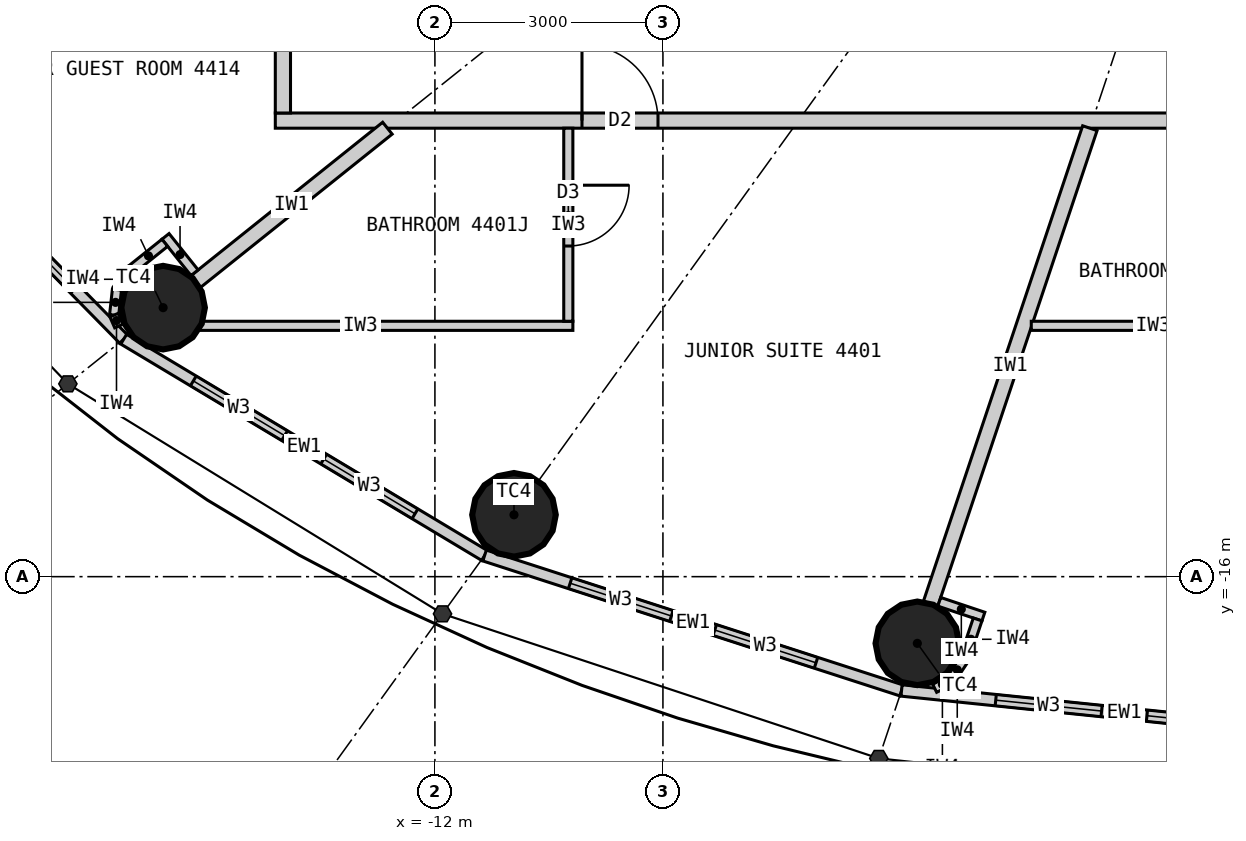
"""IFC4 building model, lengths in metres.
Left out: names, types, materials, properties, quantities, classifications, styles, units other than length and angle.
Written with IfcOpenShell. Run it as: python <this file> out.ifc"""

import sys

from ifc_helpers import new_model, si_unit, direction, frame, frame_2d, origin, origin_2d, place, context, subcontext, project, spatial, rectangle, circle, extrude, element, fill, save


model = new_model("IFC4")
c1 = context("Model", 3, precision=1e-05, world=origin(), true_north=direction((0.0, 1.0)))
c2 = subcontext(c1, "Body", "Model", "MODEL_VIEW")
j1 = project(units=[si_unit("LENGTHUNIT", "METRE"), si_unit("PLANEANGLEUNIT", "RADIAN")], contexts=[c1])
p1 = place(None, origin())
s1 = spatial("IfcSite", under=j1, at=p1, CompositionType="ELEMENT")
p2 = place(p1, origin())
s2 = spatial("IfcBuilding", under=s1, at=p2, CompositionType="ELEMENT")
p3 = place(p2, frame((0.0, 0.0, 166.5)))
s3 = spatial("IfcBuildingStorey", under=s2, at=p3, CompositionType="ELEMENT", Elevation=166.5)
for number, where, z_axis, x_axis in (
    (1, (-15.576, -12.461, 0.0), (0.0, 0.0, 1.0), (1.0, 0.0, 0.0)),
    (2, (-10.96, -15.186, 0.0), (0.0, 0.0, 1.0), (1.0, 0.0, 0.0)),
    (3, (-5.653, -16.877, 0.0), (0.0, 0.0, 1.0), (1.0, 0.0, 0.0)),
):
    element("IfcColumn", number, at=place(p3, frame(where, z_axis=z_axis, x_axis=x_axis)), inside=s3, PredefinedType="COLUMN", context=c2, shape_type="SweptSolid", body=[
        extrude(circle(Radius=0.55, at=origin_2d()), origin(), (0.0, 0.0, 1.0), 3.3),
    ])
p4 = place(p3, frame((-19.772, -9.132, 0.0), z_axis=(0.0, 0.0, 1.0), x_axis=(0.700727467776, -0.71342905457, 0.0)))
e4 = element("IfcWall", 4, at=p4, inside=s3, PredefinedType="ELEMENTEDWALL", context=c2, shape_type="SweptSolid", body=[
    extrude(rectangle(XDim=5.247, YDim=0.15, at=frame_2d((2.624, 0.0))), origin(), (0.0, 0.0, 1.0), 3.12),
])
p5 = place(p4, frame((0.924, 0.0, 0.9)))
e5 = element("IfcOpeningElement", 5, at=p5, cuts=e4, PredefinedType="OPENING", context=c2, shape_type="SweptSolid", body=[
    extrude(rectangle(XDim=1.4, YDim=1.9, at=frame_2d((0.7, 0.95))), frame((0.0, 0.085, 0.0), z_axis=(0.0, -1.0, 0.0), x_axis=(1.0, 0.0, 0.0)), (0.0, 0.0, 1.0), 0.17),
])
p6 = place(p4, frame((2.924, 0.0, 0.9)))
e6 = element("IfcOpeningElement", 6, at=p6, cuts=e4, PredefinedType="OPENING", context=c2, shape_type="SweptSolid", body=[
    extrude(rectangle(XDim=1.4, YDim=1.9, at=frame_2d((0.7, 0.95))), frame((0.0, 0.085, 0.0), z_axis=(0.0, -1.0, 0.0), x_axis=(1.0, 0.0, 0.0)), (0.0, 0.0, 1.0), 0.17),
])
p7 = place(p3, frame((-16.095, -12.876, 0.0), z_axis=(0.0, 0.0, 1.0), x_axis=(0.857695199231, -0.514158482587, 0.0)))
e7 = element("IfcWall", 7, at=p7, inside=s3, PredefinedType="ELEMENTEDWALL", context=c2, shape_type="SweptSolid", body=[
    extrude(rectangle(XDim=5.536, YDim=0.15, at=frame_2d((2.768, 0.0))), origin(), (0.0, 0.0, 1.0), 3.12),
])
p8 = place(p7, frame((1.068, 0.0, 0.9)))
e8 = element("IfcOpeningElement", 8, at=p8, cuts=e7, PredefinedType="OPENING", context=c2, shape_type="SweptSolid", body=[
    extrude(rectangle(XDim=1.4, YDim=1.9, at=frame_2d((0.7, 0.95))), frame((0.0, 0.085, 0.0), z_axis=(0.0, -1.0, 0.0), x_axis=(1.0, 0.0, 0.0)), (0.0, 0.0, 1.0), 0.17),
])
p9 = place(p7, frame((3.068, 0.0, 0.9)))
e9 = element("IfcOpeningElement", 9, at=p9, cuts=e7, PredefinedType="OPENING", context=c2, shape_type="SweptSolid", body=[
    extrude(rectangle(XDim=1.4, YDim=1.9, at=frame_2d((0.7, 0.95))), frame((0.0, 0.085, 0.0), z_axis=(0.0, -1.0, 0.0), x_axis=(1.0, 0.0, 0.0)), (0.0, 0.0, 1.0), 0.17),
])
p10 = place(p3, frame((-11.346, -15.722, 0.0), z_axis=(0.0, 0.0, 1.0), x_axis=(0.951432482129, -0.307857486429, 0.0)))
e10 = element("IfcWall", 10, at=p10, inside=s3, PredefinedType="ELEMENTEDWALL", context=c2, shape_type="SweptSolid", body=[
    extrude(rectangle(XDim=5.766, YDim=0.15, at=frame_2d((2.883, 0.0))), origin(), (0.0, 0.0, 1.0), 3.12),
])
p11 = place(p10, frame((1.183, 0.0, 0.9)))
e11 = element("IfcOpeningElement", 11, at=p11, cuts=e10, PredefinedType="OPENING", context=c2, shape_type="SweptSolid", body=[
    extrude(rectangle(XDim=1.4, YDim=1.9, at=frame_2d((0.7, 0.95))), frame((0.0, 0.085, 0.0), z_axis=(0.0, -1.0, 0.0), x_axis=(1.0, 0.0, 0.0)), (0.0, 0.0, 1.0), 0.17),
])
p12 = place(p10, frame((3.183, 0.0, 0.9)))
e12 = element("IfcOpeningElement", 12, at=p12, cuts=e10, PredefinedType="OPENING", context=c2, shape_type="SweptSolid", body=[
    extrude(rectangle(XDim=1.4, YDim=1.9, at=frame_2d((0.7, 0.95))), frame((0.0, 0.085, 0.0), z_axis=(0.0, -1.0, 0.0), x_axis=(1.0, 0.0, 0.0)), (0.0, 0.0, 1.0), 0.17),
])
p13 = place(p3, frame((-5.86, -17.497, 0.0), z_axis=(0.0, 0.0, 1.0), x_axis=(0.994751738032, -0.102318032045, 0.0)))
e13 = element("IfcWall", 13, at=p13, inside=s3, PredefinedType="ELEMENTEDWALL", context=c2, shape_type="SweptSolid", body=[
    extrude(rectangle(XDim=5.891, YDim=0.15, at=frame_2d((2.946, 0.0))), origin(), (0.0, 0.0, 1.0), 3.12),
])
p14 = place(p13, frame((1.246, 0.0, 0.9)))
e14 = element("IfcOpeningElement", 14, at=p14, cuts=e13, PredefinedType="OPENING", context=c2, shape_type="SweptSolid", body=[
    extrude(rectangle(XDim=1.4, YDim=1.9, at=frame_2d((0.7, 0.95))), frame((0.0, 0.085, 0.0), z_axis=(0.0, -1.0, 0.0), x_axis=(1.0, 0.0, 0.0)), (0.0, 0.0, 1.0), 0.17),
])
p15 = place(p13, frame((3.246, 0.0, 0.9)))
e15 = element("IfcOpeningElement", 15, at=p15, cuts=e13, PredefinedType="OPENING", context=c2, shape_type="SweptSolid", body=[
    extrude(rectangle(XDim=1.4, YDim=1.9, at=frame_2d((0.7, 0.95))), frame((0.0, 0.085, 0.0), z_axis=(0.0, -1.0, 0.0), x_axis=(1.0, 0.0, 0.0)), (0.0, 0.0, 1.0), 0.17),
])
p16 = place(p3, frame((14.1, -10.0, 0.0), z_axis=(0.0, 0.0, 1.0), x_axis=(-1.0, 0.0, 0.0)))
e16 = element("IfcWall", 16, at=p16, inside=s3, PredefinedType="PARTITIONING", context=c2, shape_type="SweptSolid", body=[
    extrude(rectangle(XDim=28.2, YDim=0.2, at=frame_2d((14.1, 0.0))), origin(), (0.0, 0.0, 1.0), 3.12),
])
p17 = place(p16, frame((23.165, 0.0, 0.0)))
e17 = element("IfcOpeningElement", 17, at=p17, cuts=e16, PredefinedType="OPENING", context=c2, shape_type="SweptSolid", body=[
    extrude(rectangle(XDim=1.0, YDim=2.2, at=frame_2d((0.5, 1.1))), frame((0.0, 0.11, 0.0), z_axis=(0.0, -1.0, 0.0), x_axis=(1.0, 0.0, 0.0)), (0.0, 0.0, 1.0), 0.22),
])
p18 = place(p16, frame((13.923, 0.0, 0.0)))
e18 = element("IfcOpeningElement", 18, at=p18, cuts=e16, PredefinedType="OPENING", context=c2, shape_type="SweptSolid", body=[
    extrude(rectangle(XDim=1.0, YDim=2.2, at=frame_2d((0.5, 1.1))), frame((0.0, 0.11, 0.0), z_axis=(0.0, -1.0, 0.0), x_axis=(1.0, 0.0, 0.0)), (0.0, 0.0, 1.0), 0.22),
])
p19 = place(p16, frame((7.957, 0.0, 0.0)))
e19 = element("IfcOpeningElement", 19, at=p19, cuts=e16, PredefinedType="OPENING", context=c2, shape_type="SweptSolid", body=[
    extrude(rectangle(XDim=1.0, YDim=2.2, at=frame_2d((0.5, 1.1))), frame((0.0, 0.11, 0.0), z_axis=(0.0, -1.0, 0.0), x_axis=(1.0, 0.0, 0.0)), (0.0, 0.0, 1.0), 0.22),
])
p20 = place(p3, frame((-12.625, -10.1, 0.0), z_axis=(0.0, 0.0, 1.0), x_axis=(-0.780876185034, -0.624685827954, 0.0)))
e20 = element("IfcWall", 20, at=p20, inside=s3, PredefinedType="PARTITIONING", context=c2, shape_type="SweptSolid", body=[
    extrude(rectangle(XDim=3.229, YDim=0.2, at=frame_2d((1.615, 0.0))), origin(), (0.0, 0.0, 1.0), 2.42),
])
p21 = place(p3, frame((-3.383, -10.1, 0.0), z_axis=(0.0, 0.0, 1.0), x_axis=(-0.317615120474, -0.948219718866, 0.0)))
e21 = element("IfcWall", 21, at=p21, inside=s3, PredefinedType="PARTITIONING", context=c2, shape_type="SweptSolid", body=[
    extrude(rectangle(XDim=6.597, YDim=0.2, at=frame_2d((3.299, 0.0))), origin(), (0.0, 0.0, 1.0), 2.42),
])
p22 = place(p3, frame((-15.775, -12.7, 0.0), z_axis=(0.0, 0.0, 1.0), x_axis=(1.0, 0.0, 0.0)))
e22 = element("IfcWall", 22, at=p22, inside=s3, PredefinedType="PARTITIONING", context=c2, shape_type="SweptSolid", body=[
    extrude(rectangle(XDim=5.59, YDim=0.12, at=frame_2d((2.795, 0.0))), origin(), (0.0, 0.0, 1.0), 3.12),
])
p23 = place(p3, frame((-10.245, -10.1, 0.0), z_axis=(0.0, 0.0, 1.0), x_axis=(0.0, -1.0, 0.0)))
e23 = element("IfcWall", 23, at=p23, inside=s3, PredefinedType="PARTITIONING", context=c2, shape_type="SweptSolid", body=[
    extrude(rectangle(XDim=2.54, YDim=0.12, at=frame_2d((1.27, 0.0))), origin(), (0.0, 0.0, 1.0), 3.12),
])
p24 = place(p23, frame((0.75, 0.0, 0.0)))
e24 = element("IfcOpeningElement", 24, at=p24, cuts=e23, PredefinedType="OPENING", context=c2, shape_type="SweptSolid", body=[
    extrude(rectangle(XDim=0.8, YDim=2.1, at=frame_2d((0.4, 1.05))), frame((0.0, 0.07, 0.0), z_axis=(0.0, -1.0, 0.0), x_axis=(1.0, 0.0, 0.0)), (0.0, 0.0, 1.0), 0.14),
])
p25 = place(p3, frame((-4.154, -12.7, 0.0), z_axis=(0.0, 0.0, 1.0), x_axis=(1.0, 0.0, 0.0)))
e25 = element("IfcWall", 25, at=p25, inside=s3, PredefinedType="PARTITIONING", context=c2, shape_type="SweptSolid", body=[
    extrude(rectangle(XDim=3.211, YDim=0.12, at=frame_2d((1.605, 0.0))), origin(), (0.0, 0.0, 1.0), 3.12),
])
p26 = place(p3, frame((-14.0, -1.67, 0.0), z_axis=(0.0, 0.0, 1.0), x_axis=(0.0, -1.0, 0.0)))
e26 = element("IfcWall", 26, at=p26, inside=s3, PredefinedType="PARTITIONING", context=c2, shape_type="SweptSolid", body=[
    extrude(rectangle(XDim=8.23, YDim=0.2, at=frame_2d((4.115, 0.0))), origin(), (0.0, 0.0, 1.0), 3.12),
])
p27 = place(p26, frame((5.552, 0.0, 0.0)))
e27 = element("IfcOpeningElement", 27, at=p27, cuts=e26, PredefinedType="OPENING", context=c2, shape_type="SweptSolid", body=[
    extrude(rectangle(XDim=1.0, YDim=2.2, at=frame_2d((0.5, 1.1))), frame((0.0, 0.11, 0.0), z_axis=(0.0, -1.0, 0.0), x_axis=(1.0, 0.0, 0.0)), (0.0, 0.0, 1.0), 0.22),
])
p28 = place(p3, frame((-15.162, -12.002, 0.0), z_axis=(0.0, 0.0, 1.0), x_axis=(-0.624597762427, 0.780946627607, 0.0)))
e28 = element("IfcWall", 28, at=p28, inside=s3, PredefinedType="PARTITIONING", context=c2, shape_type="SweptSolid", body=[
    extrude(rectangle(XDim=0.612, YDim=0.12, at=frame_2d((0.306, 0.0))), origin(), (0.0, 0.0, 1.0), 3.12),
])
p29 = place(p3, frame((-15.554, -11.608, 0.0), z_axis=(0.0, 0.0, 1.0), x_axis=(-0.780695577787, -0.624911525597, 0.0)))
e29 = element("IfcWall", 29, at=p29, inside=s3, PredefinedType="PARTITIONING", context=c2, shape_type="SweptSolid", body=[
    extrude(rectangle(XDim=0.55, YDim=0.12, at=frame_2d((0.275, 0.0))), origin(), (0.0, 0.0, 1.0), 3.12),
])
p30 = place(p3, frame((-15.984, -11.952, 0.0), z_axis=(0.0, 0.0, 1.0), x_axis=(-0.592335221171, -0.805691619517, 0.0)))
e30 = element("IfcWall", 30, at=p30, inside=s3, PredefinedType="PARTITIONING", context=c2, shape_type="SweptSolid", body=[
    extrude(rectangle(XDim=0.338, YDim=0.12, at=frame_2d((0.169, 0.0))), origin(), (0.0, 0.0, 1.0), 3.12),
])
p31 = place(p3, frame((-16.184, -12.224, 0.0), z_axis=(0.0, 0.0, 1.0), x_axis=(-0.110669692975, -0.993857242795, 0.0)))
e31 = element("IfcWall", 31, at=p31, inside=s3, PredefinedType="PARTITIONING", context=c2, shape_type="SweptSolid", body=[
    extrude(rectangle(XDim=0.337, YDim=0.12, at=frame_2d((0.169, 0.0))), origin(), (0.0, 0.0, 1.0), 3.12),
])
p32 = place(p3, frame((-16.221, -12.559, 0.0), z_axis=(0.0, 0.0, 1.0), x_axis=(0.401064416249, -0.916049853457, 0.0)))
e32 = element("IfcWall", 32, at=p32, inside=s3, PredefinedType="PARTITIONING", context=c2, shape_type="SweptSolid", body=[
    extrude(rectangle(XDim=0.156, YDim=0.12, at=frame_2d((0.078, 0.0))), origin(), (0.0, 0.0, 1.0), 3.12),
])
p33 = place(p3, frame((-5.364, -16.331, 0.0), z_axis=(0.0, 0.0, 1.0), x_axis=(0.948283770087, -0.317423835572, 0.0)))
e33 = element("IfcWall", 33, at=p33, inside=s3, PredefinedType="PARTITIONING", context=c2, shape_type="SweptSolid", body=[
    extrude(rectangle(XDim=0.612, YDim=0.12, at=frame_2d((0.306, 0.0))), origin(), (0.0, 0.0, 1.0), 3.12),
])
p34 = place(p3, frame((-4.86, -16.563, 0.0), z_axis=(0.0, 0.0, 1.0), x_axis=(-0.317825321803, -0.948149284038, 0.0)))
e34 = element("IfcWall", 34, at=p34, inside=s3, PredefinedType="PARTITIONING", context=c2, shape_type="SweptSolid", body=[
    extrude(rectangle(XDim=0.55, YDim=0.12, at=frame_2d((0.275, 0.0))), origin(), (0.0, 0.0, 1.0), 3.12),
])
p35 = place(p3, frame((-5.034, -17.084, 0.0), z_axis=(0.0, 0.0, 1.0), x_axis=(-0.552362205726, -0.833604218851, 0.0)))
e35 = element("IfcWall", 35, at=p35, inside=s3, PredefinedType="PARTITIONING", context=c2, shape_type="SweptSolid", body=[
    extrude(rectangle(XDim=0.338, YDim=0.12, at=frame_2d((0.169, 0.0))), origin(), (0.0, 0.0, 1.0), 3.12),
])
p36 = place(p3, frame((-5.221, -17.366, 0.0), z_axis=(0.0, 0.0, 1.0), x_axis=(-0.895067896179, -0.445929883759, 0.0)))
e36 = element("IfcWall", 36, at=p36, inside=s3, PredefinedType="PARTITIONING", context=c2, shape_type="SweptSolid", body=[
    extrude(rectangle(XDim=0.228, YDim=0.12, at=frame_2d((0.114, 0.0))), origin(), (0.0, 0.0, 1.0), 3.12),
])
p37 = place(p6, origin())
e37 = element("IfcWindow", 37, at=p37, inside=s3, PartitioningType="SINGLE_PANEL", PredefinedType="WINDOW", context=c2, shape_type="SweptSolid", body=[
    extrude(rectangle(XDim=1.4, YDim=1.9, at=frame_2d((0.7, 0.95))), frame((0.0, 0.03, 0.0), z_axis=(0.0, -1.0, 0.0), x_axis=(1.0, 0.0, 0.0)), (0.0, 0.0, 1.0), 0.06),
])
fill(e6, e37)
p38 = place(p8, origin())
e38 = element("IfcWindow", 38, at=p38, inside=s3, PartitioningType="SINGLE_PANEL", PredefinedType="WINDOW", context=c2, shape_type="SweptSolid", body=[
    extrude(rectangle(XDim=1.4, YDim=1.9, at=frame_2d((0.7, 0.95))), frame((0.0, 0.03, 0.0), z_axis=(0.0, -1.0, 0.0), x_axis=(1.0, 0.0, 0.0)), (0.0, 0.0, 1.0), 0.06),
])
fill(e8, e38)
p39 = place(p9, origin())
e39 = element("IfcWindow", 39, at=p39, inside=s3, PartitioningType="SINGLE_PANEL", PredefinedType="WINDOW", context=c2, shape_type="SweptSolid", body=[
    extrude(rectangle(XDim=1.4, YDim=1.9, at=frame_2d((0.7, 0.95))), frame((0.0, 0.03, 0.0), z_axis=(0.0, -1.0, 0.0), x_axis=(1.0, 0.0, 0.0)), (0.0, 0.0, 1.0), 0.06),
])
fill(e9, e39)
p40 = place(p11, origin())
e40 = element("IfcWindow", 40, at=p40, inside=s3, PartitioningType="SINGLE_PANEL", PredefinedType="WINDOW", context=c2, shape_type="SweptSolid", body=[
    extrude(rectangle(XDim=1.4, YDim=1.9, at=frame_2d((0.7, 0.95))), frame((0.0, 0.03, 0.0), z_axis=(0.0, -1.0, 0.0), x_axis=(1.0, 0.0, 0.0)), (0.0, 0.0, 1.0), 0.06),
])
fill(e11, e40)
p41 = place(p12, origin())
e41 = element("IfcWindow", 41, at=p41, inside=s3, PartitioningType="SINGLE_PANEL", PredefinedType="WINDOW", context=c2, shape_type="SweptSolid", body=[
    extrude(rectangle(XDim=1.4, YDim=1.9, at=frame_2d((0.7, 0.95))), frame((0.0, 0.03, 0.0), z_axis=(0.0, -1.0, 0.0), x_axis=(1.0, 0.0, 0.0)), (0.0, 0.0, 1.0), 0.06),
])
fill(e12, e41)
p42 = place(p14, origin())
e42 = element("IfcWindow", 42, at=p42, inside=s3, PartitioningType="SINGLE_PANEL", PredefinedType="WINDOW", context=c2, shape_type="SweptSolid", body=[
    extrude(rectangle(XDim=1.4, YDim=1.9, at=frame_2d((0.7, 0.95))), frame((0.0, 0.03, 0.0), z_axis=(0.0, -1.0, 0.0), x_axis=(1.0, 0.0, 0.0)), (0.0, 0.0, 1.0), 0.06),
])
fill(e14, e42)
p43 = place(p15, origin())
e43 = element("IfcWindow", 43, at=p43, inside=s3, PartitioningType="SINGLE_PANEL", PredefinedType="WINDOW", context=c2, shape_type="SweptSolid", body=[
    extrude(rectangle(XDim=1.4, YDim=1.9, at=frame_2d((0.7, 0.95))), frame((0.0, 0.03, 0.0), z_axis=(0.0, -1.0, 0.0), x_axis=(1.0, 0.0, 0.0)), (0.0, 0.0, 1.0), 0.06),
])
fill(e15, e43)
p44 = place(p24, origin())
e44 = element("IfcDoor", 44, at=p44, inside=s3, OperationType="SINGLE_SWING_LEFT", PredefinedType="DOOR", context=c2, shape_type="SweptSolid", body=[
    extrude(rectangle(XDim=0.8, YDim=2.1, at=frame_2d((0.4, 1.05))), frame((0.0, 0.025, 0.0), z_axis=(0.0, -1.0, 0.0), x_axis=(1.0, 0.0, 0.0)), (0.0, 0.0, 1.0), 0.05),
])
fill(e24, e44)
p45 = place(p17, origin())
e45 = element("IfcDoor", 45, at=p45, inside=s3, OperationType="SINGLE_SWING_RIGHT", PredefinedType="DOOR", context=c2, shape_type="SweptSolid", body=[
    extrude(rectangle(XDim=1.0, YDim=2.2, at=frame_2d((0.5, 1.1))), frame((0.0, 0.025, 0.0), z_axis=(0.0, -1.0, 0.0), x_axis=(1.0, 0.0, 0.0)), (0.0, 0.0, 1.0), 0.05),
])
fill(e17, e45)
save(model, sys.argv[1])
